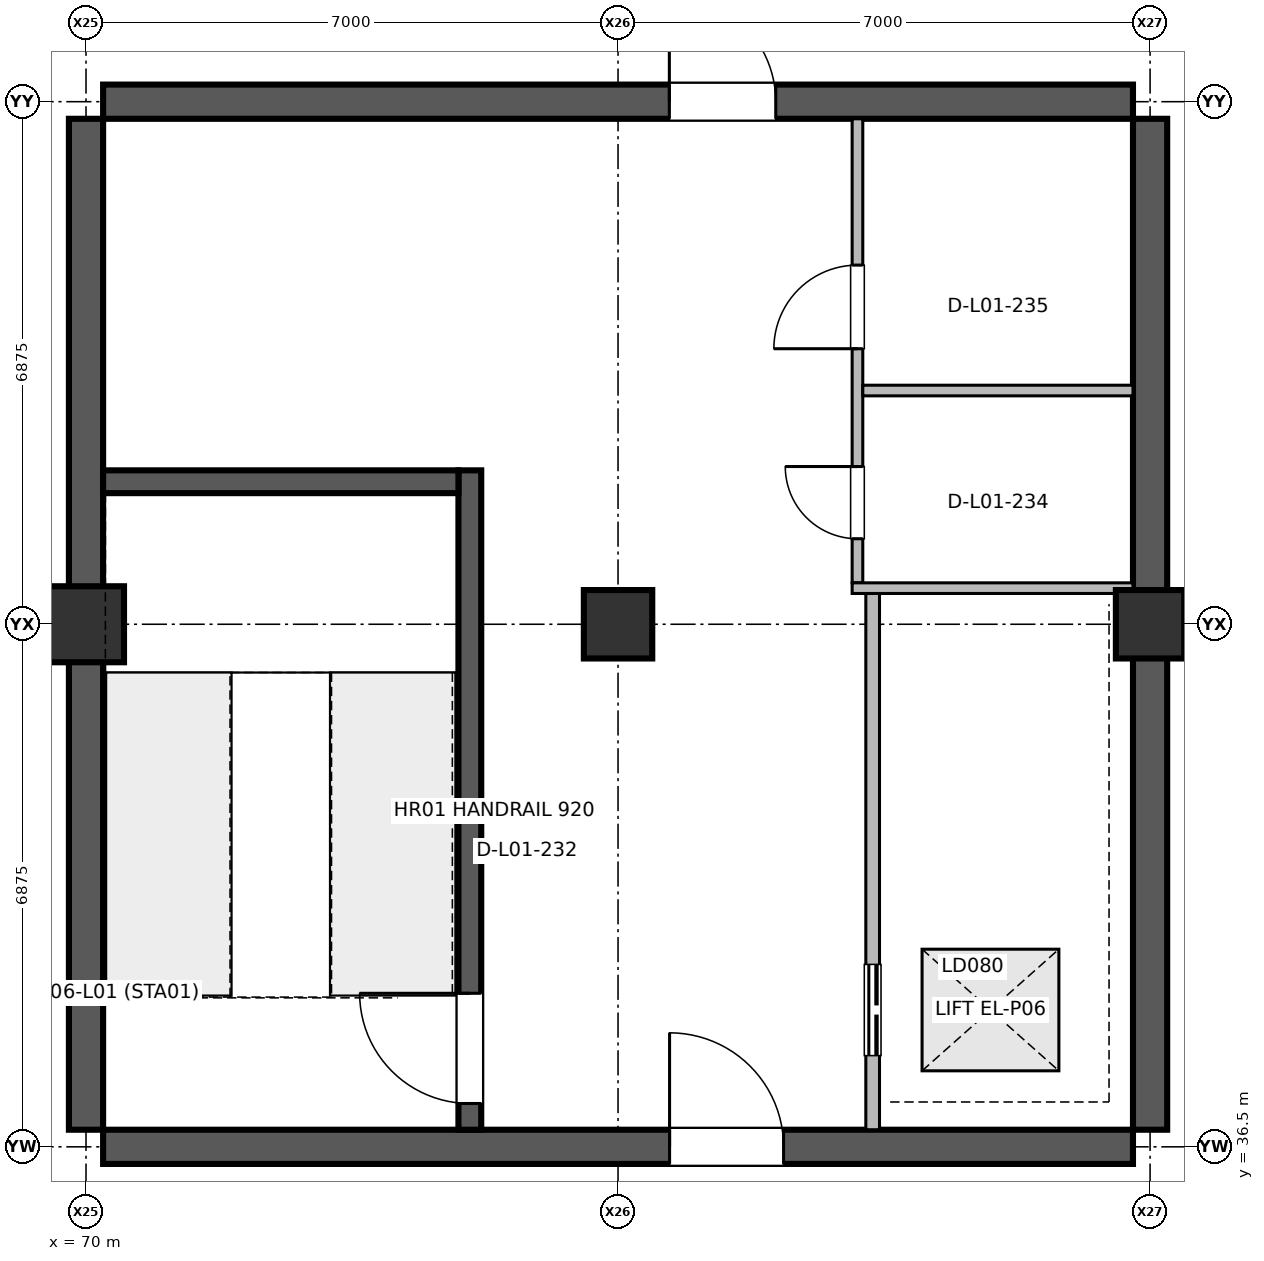
"""IFC4 building model, lengths in metres.
Left out: names, types, materials, properties, quantities, classifications, styles, units other than length and angle.
Written with IfcOpenShell. Run it as: python <this file> out.ifc"""

import sys

from ifc_helpers import new_model, si_unit, direction, frame, frame_2d, origin, origin_2d, place, context, subcontext, project, spatial, rectangle, extrude, element, fill, save


model = new_model("IFC4")
c1 = context("Model", 3, precision=1e-05, world=origin(), true_north=direction((0.0, 1.0)))
c2 = subcontext(c1, "Body", "Model", "MODEL_VIEW")
j1 = project(units=[si_unit("LENGTHUNIT", "METRE"), si_unit("PLANEANGLEUNIT", "RADIAN")], contexts=[c1])
p1 = place(None, origin())
s1 = spatial("IfcSite", under=j1, at=p1, CompositionType="ELEMENT")
p2 = place(p1, origin())
s2 = spatial("IfcBuilding", under=s1, at=p2, CompositionType="ELEMENT")
p3 = place(p2, origin())
s3 = spatial("IfcBuildingStorey", under=s2, at=p3, CompositionType="ELEMENT", Elevation=0.0)
p4 = place(p3, frame((70.0, 43.375, 0.0), z_axis=(0.0, 0.0, 1.0), x_axis=(1.0, 0.0, 0.0)))
e1 = element("IfcColumn", 1, at=p4, inside=s3, PredefinedType="COLUMN", context=c2, shape_type="SweptSolid", body=[
    extrude(rectangle(XDim=1.0, YDim=1.0, at=origin_2d()), origin(), (0.0, 0.0, 1.0), 5.998),
])
for number, where, z_axis, x_axis in (
    (2, (77.0, 43.375, 0.0), (0.0, 0.0, 1.0), (1.0, 0.0, 0.0)),
    (3, (84.0, 43.375, 0.0), (0.0, 0.0, 1.0), (1.0, 0.0, 0.0)),
):
    element("IfcColumn", number, at=place(p3, frame(where, z_axis=z_axis, x_axis=x_axis)), inside=s3, PredefinedType="COLUMN", context=c2, shape_type="SweptSolid", body=[
        extrude(rectangle(XDim=0.9, YDim=0.9, at=origin_2d()), origin(), (0.0, 0.0, 1.0), 5.998),
    ])
for number, where, z_axis, x_axis in (
    (4, (70.0, 36.725, 0.0), (0.0, 0.0, 1.0), (0.0, 1.0, 0.0)),
    (5, (84.0, 36.725, 0.0), (0.0, 0.0, 1.0), (0.0, 1.0, 0.0)),
):
    element("IfcWall", number, at=place(p3, frame(where, z_axis=z_axis, x_axis=x_axis)), inside=s3, PredefinedType="SHEAR", context=c2, shape_type="SweptSolid", body=[
        extrude(rectangle(XDim=13.3, YDim=0.45, at=frame_2d((6.65, 0.0))), origin(), (0.0, 0.0, 1.0), 5.75),
    ])
p5 = place(p3, frame((70.225, 36.5, 0.0), z_axis=(0.0, 0.0, 1.0), x_axis=(1.0, 0.0, 0.0)))
e6 = element("IfcWall", 6, at=p5, inside=s3, PredefinedType="SHEAR", context=c2, shape_type="SweptSolid", body=[
    extrude(rectangle(XDim=13.55, YDim=0.45, at=frame_2d((6.775, 0.0))), origin(), (0.0, 0.0, 1.0), 5.75),
])
p6 = place(p5, frame((7.453, 0.0, 0.0)))
e7 = element("IfcOpeningElement", 7, at=p6, cuts=e6, PredefinedType="OPENING", context=c2, shape_type="SweptSolid", body=[
    extrude(rectangle(XDim=1.5, YDim=2.2, at=frame_2d((0.75, 1.1))), frame((0.0, 0.235, 0.0), z_axis=(0.0, -1.0, 0.0), x_axis=(1.0, 0.0, 0.0)), (0.0, 0.0, 1.0), 0.47),
])
p7 = place(p3, frame((70.225, 50.25, 0.0), z_axis=(0.0, 0.0, 1.0), x_axis=(1.0, 0.0, 0.0)))
e8 = element("IfcWall", 8, at=p7, inside=s3, PredefinedType="SHEAR", context=c2, shape_type="SweptSolid", body=[
    extrude(rectangle(XDim=13.55, YDim=0.45, at=frame_2d((6.775, 0.0))), origin(), (0.0, 0.0, 1.0), 5.75),
])
p8 = place(p7, frame((7.45, 0.0, 0.0)))
e9 = element("IfcOpeningElement", 9, at=p8, cuts=e8, PredefinedType="OPENING", context=c2, shape_type="SweptSolid", body=[
    extrude(rectangle(XDim=1.4, YDim=2.2, at=frame_2d((0.7, 1.1))), frame((0.0, 0.235, 0.0), z_axis=(0.0, -1.0, 0.0), x_axis=(1.0, 0.0, 0.0)), (0.0, 0.0, 1.0), 0.47),
])
p9 = place(p3, frame((75.05, 36.725, 0.0), z_axis=(0.0, 0.0, 1.0), x_axis=(0.0, 1.0, 0.0)))
e10 = element("IfcWall", 10, at=p9, inside=s3, PredefinedType="SHEAR", context=c2, shape_type="SweptSolid", body=[
    extrude(rectangle(XDim=8.675, YDim=0.3, at=frame_2d((4.337, 0.0))), origin(), (0.0, 0.0, 1.0), 5.75),
])
p10 = place(p9, frame((0.345, 0.0, 0.0)))
e11 = element("IfcOpeningElement", 11, at=p10, cuts=e10, PredefinedType="OPENING", context=c2, shape_type="SweptSolid", body=[
    extrude(rectangle(XDim=1.45, YDim=2.2, at=frame_2d((0.725, 1.1))), frame((0.0, 0.16, 0.0), z_axis=(0.0, -1.0, 0.0), x_axis=(1.0, 0.0, 0.0)), (0.0, 0.0, 1.0), 0.32),
])
p11 = place(p3, frame((80.35, 36.725, 0.0), z_axis=(0.0, 0.0, 1.0), x_axis=(0.0, 1.0, 0.0)))
e12 = element("IfcWall", 12, at=p11, inside=s3, PredefinedType="PARTITIONING", context=c2, shape_type="SweptSolid", body=[
    extrude(rectangle(XDim=7.055, YDim=0.18, at=frame_2d((3.527, 0.0))), origin(), (0.0, 0.0, 1.0), 4.125),
])
p12 = place(p11, frame((0.975, 0.0, 0.0)))
e13 = element("IfcOpeningElement", 13, at=p12, cuts=e12, PredefinedType="OPENING", context=c2, shape_type="SweptSolid", body=[
    extrude(rectangle(XDim=1.2, YDim=2.25, at=frame_2d((0.6, 1.125))), frame((0.0, 0.1, 0.0), z_axis=(0.0, -1.0, 0.0), x_axis=(1.0, 0.0, 0.0)), (0.0, 0.0, 1.0), 0.2),
])
p13 = place(p3, frame((80.15, 43.92, 0.0), z_axis=(0.0, 0.0, 1.0), x_axis=(0.0, 1.0, 0.0)))
e14 = element("IfcWall", 14, at=p13, inside=s3, PredefinedType="PARTITIONING", context=c2, shape_type="SweptSolid", body=[
    extrude(rectangle(XDim=6.105, YDim=0.14, at=frame_2d((3.052, 0.0))), origin(), (0.0, 0.0, 1.0), 4.125),
])
p14 = place(p13, frame((0.58, 0.0, 0.0)))
e15 = element("IfcOpeningElement", 15, at=p14, cuts=e14, PredefinedType="OPENING", context=c2, shape_type="SweptSolid", body=[
    extrude(rectangle(XDim=0.95, YDim=2.15, at=frame_2d((0.475, 1.075))), frame((0.0, 0.08, 0.0), z_axis=(0.0, -1.0, 0.0), x_axis=(1.0, 0.0, 0.0)), (0.0, 0.0, 1.0), 0.16),
])
p15 = place(p13, frame((3.08, 0.0, 0.0)))
e16 = element("IfcOpeningElement", 16, at=p15, cuts=e14, PredefinedType="OPENING", context=c2, shape_type="SweptSolid", body=[
    extrude(rectangle(XDim=1.1, YDim=2.15, at=frame_2d((0.55, 1.075))), frame((0.0, 0.08, 0.0), z_axis=(0.0, -1.0, 0.0), x_axis=(1.0, 0.0, 0.0)), (0.0, 0.0, 1.0), 0.16),
])
p16 = place(p3, frame((80.08, 43.85, 0.0), z_axis=(0.0, 0.0, 1.0), x_axis=(1.0, 0.0, 0.0)))
e17 = element("IfcWall", 17, at=p16, inside=s3, PredefinedType="PARTITIONING", context=c2, shape_type="SweptSolid", body=[
    extrude(rectangle(XDim=3.695, YDim=0.14, at=frame_2d((1.847, 0.0))), origin(), (0.0, 0.0, 1.0), 4.125),
])
p17 = place(p3, frame((80.22, 46.45, 0.0), z_axis=(0.0, 0.0, 1.0), x_axis=(1.0, 0.0, 0.0)))
e18 = element("IfcWall", 18, at=p17, inside=s3, PredefinedType="PARTITIONING", context=c2, shape_type="SweptSolid", body=[
    extrude(rectangle(XDim=3.555, YDim=0.14, at=frame_2d((1.777, 0.0))), origin(), (0.0, 0.0, 1.0), 5.02),
])
p18 = place(p3, frame((70.225, 45.25, 0.0), z_axis=(0.0, 0.0, 1.0), x_axis=(1.0, 0.0, 0.0)))
e19 = element("IfcWall", 19, at=p18, inside=s3, PredefinedType="SHEAR", context=c2, shape_type="SweptSolid", body=[
    extrude(rectangle(XDim=4.675, YDim=0.3, at=frame_2d((2.337, 0.0))), origin(), (0.0, 0.0, 1.0), 5.75),
])
p19 = place(p8, origin())
e20 = element("IfcDoor", 20, at=p19, inside=s3, OperationType="SINGLE_SWING_LEFT", PredefinedType="DOOR", context=c2, shape_type="SweptSolid", body=[
    extrude(rectangle(XDim=1.4, YDim=2.2, at=frame_2d((0.7, 1.1))), frame((0.0, 0.025, 0.0), z_axis=(0.0, -1.0, 0.0), x_axis=(1.0, 0.0, 0.0)), (0.0, 0.0, 1.0), 0.05),
])
fill(e9, e20)
p20 = place(p6, origin())
e21 = element("IfcDoor", 21, at=p20, inside=s3, OperationType="SINGLE_SWING_LEFT", PredefinedType="DOOR", context=c2, shape_type="SweptSolid", body=[
    extrude(rectangle(XDim=1.5, YDim=2.2, at=frame_2d((0.75, 1.1))), frame((0.0, 0.025, 0.0), z_axis=(0.0, -1.0, 0.0), x_axis=(1.0, 0.0, 0.0)), (0.0, 0.0, 1.0), 0.05),
])
fill(e7, e21)
p21 = place(p10, origin())
e22 = element("IfcDoor", 22, at=p21, inside=s3, OperationType="SINGLE_SWING_RIGHT", PredefinedType="DOOR", context=c2, shape_type="SweptSolid", body=[
    extrude(rectangle(XDim=1.45, YDim=2.2, at=frame_2d((0.725, 1.1))), frame((0.0, 0.025, 0.0), z_axis=(0.0, -1.0, 0.0), x_axis=(1.0, 0.0, 0.0)), (0.0, 0.0, 1.0), 0.05),
])
fill(e11, e22)
p22 = place(p12, origin())
e23 = element("IfcDoor", 23, at=p22, inside=s3, OperationType="DOUBLE_DOOR_SLIDING", PredefinedType="DOOR", context=c2, shape_type="SweptSolid", body=[
    extrude(rectangle(XDim=1.2, YDim=2.25, at=frame_2d((0.6, 1.125))), frame((0.0, 0.025, 0.0), z_axis=(0.0, -1.0, 0.0), x_axis=(1.0, 0.0, 0.0)), (0.0, 0.0, 1.0), 0.05),
])
fill(e13, e23)
p23 = place(p14, origin())
e24 = element("IfcDoor", 24, at=p23, inside=s3, OperationType="SINGLE_SWING_RIGHT", PredefinedType="DOOR", context=c2, shape_type="SweptSolid", body=[
    extrude(rectangle(XDim=0.95, YDim=2.15, at=frame_2d((0.475, 1.075))), frame((0.0, 0.025, 0.0), z_axis=(0.0, -1.0, 0.0), x_axis=(1.0, 0.0, 0.0)), (0.0, 0.0, 1.0), 0.05),
])
fill(e15, e24)
p24 = place(p15, origin())
e25 = element("IfcDoor", 25, at=p24, inside=s3, OperationType="SINGLE_SWING_LEFT", PredefinedType="DOOR", context=c2, shape_type="SweptSolid", body=[
    extrude(rectangle(XDim=1.1, YDim=2.15, at=frame_2d((0.55, 1.075))), frame((0.0, 0.025, 0.0), z_axis=(0.0, -1.0, 0.0), x_axis=(1.0, 0.0, 0.0)), (0.0, 0.0, 1.0), 0.05),
])
fill(e16, e25)
save(model, sys.argv[1])
